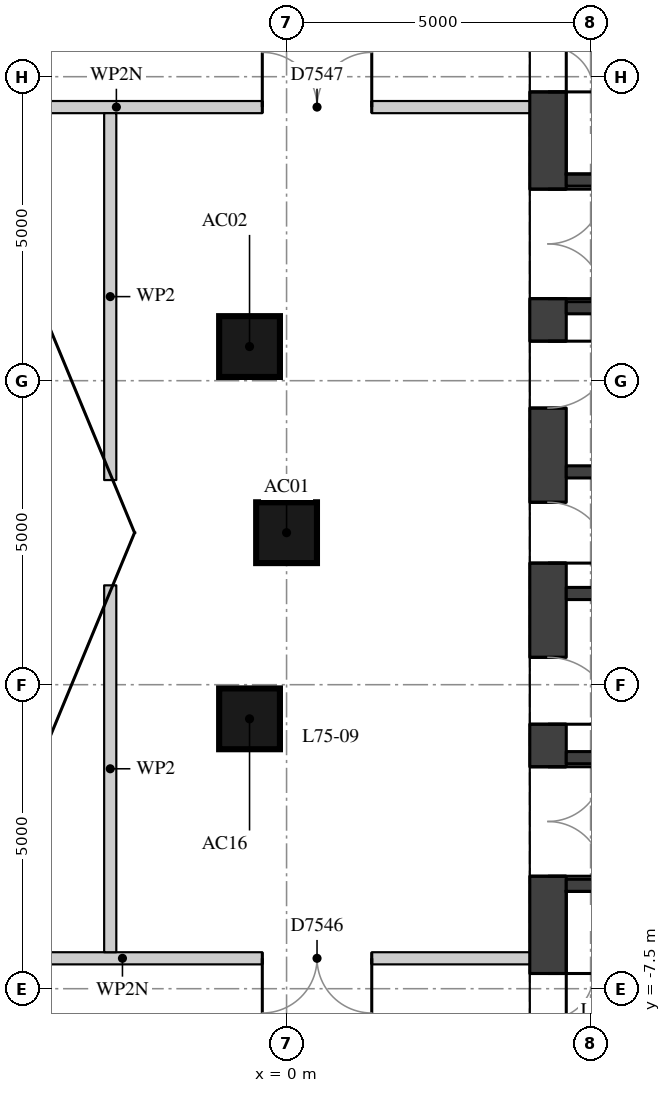
"""IFC4 building model, lengths in metres.
Left out: names, types, materials, properties, quantities, classifications, styles, units other than length and angle.
Written with IfcOpenShell. Run it as: python <this file> out.ifc"""

import sys

from ifc_helpers import new_model, si_unit, direction, frame, frame_2d, origin, origin_2d, place, context, subcontext, project, spatial, rectangle, extrude, element, fill, save


model = new_model("IFC4")
c1 = context("Model", 3, precision=1e-05, world=origin(), true_north=direction((0.0, 1.0)))
c2 = subcontext(c1, "Body", "Model", "MODEL_VIEW")
j1 = project(units=[si_unit("LENGTHUNIT", "METRE"), si_unit("PLANEANGLEUNIT", "RADIAN")], contexts=[c1])
p1 = place(None, origin())
s1 = spatial("IfcSite", under=j1, at=p1, CompositionType="ELEMENT")
p2 = place(p1, origin())
s2 = spatial("IfcBuilding", under=s1, at=p2, CompositionType="ELEMENT")
p3 = place(p2, frame((0.0, 0.0, 264.2)))
s3 = spatial("IfcBuildingStorey", under=s2, at=p3, CompositionType="ELEMENT", Elevation=264.2)
for number, where, z_axis, x_axis in (
    (1, (0.0, 0.0, 0.0), (0.0, 0.0, 1.0), (1.0, 0.0, 0.0)),
    (2, (-0.609, 3.062, 0.0), (0.0, 0.0, 1.0), (1.0, 0.0, 0.0)),
    (3, (-0.609, -3.062, 0.0), (0.0, 0.0, 1.0), (1.0, 0.0, 0.0)),
):
    element("IfcColumn", number, at=place(p3, frame(where, z_axis=z_axis, x_axis=x_axis)), inside=s3, PredefinedType="COLUMN", context=c2, shape_type="SweptSolid", body=[
        extrude(rectangle(XDim=1.0, YDim=1.0, at=origin_2d()), origin(), (0.0, 0.0, 1.0), 5.0),
    ])
p4 = place(p3, frame((4.3, -9.4, 0.0), z_axis=(0.0, 0.0, 1.0), x_axis=(0.0, 1.0, 0.0)))
e4 = element("IfcWall", 4, at=p4, inside=s3, PredefinedType="SHEAR", context=c2, shape_type="SweptSolid", body=[
    extrude(rectangle(XDim=18.8, YDim=0.6, at=frame_2d((9.4, 0.0))), origin(), (0.0, 0.0, 1.0), 4.59),
])
p5 = place(p4, frame((0.65, 0.0, 0.0)))
e5 = element("IfcOpeningElement", 5, at=p5, cuts=e4, PredefinedType="OPENING", context=c2, shape_type="SweptSolid", body=[
    extrude(rectangle(XDim=1.5, YDim=2.1, at=frame_2d((0.75, 1.05))), frame((0.0, 0.31, 0.0), z_axis=(0.0, -1.0, 0.0), x_axis=(1.0, 0.0, 0.0)), (0.0, 0.0, 1.0), 0.62),
])
p6 = place(p4, frame((3.75, 0.0, 0.0)))
e6 = element("IfcOpeningElement", 6, at=p6, cuts=e4, PredefinedType="OPENING", context=c2, shape_type="SweptSolid", body=[
    extrude(rectangle(XDim=1.8, YDim=2.1, at=frame_2d((0.9, 1.05))), frame((0.0, 0.31, 0.0), z_axis=(0.0, -1.0, 0.0), x_axis=(1.0, 0.0, 0.0)), (0.0, 0.0, 1.0), 0.62),
])
p7 = place(p4, frame((6.25, 0.0, 0.0)))
e7 = element("IfcOpeningElement", 7, at=p7, cuts=e4, PredefinedType="OPENING", context=c2, shape_type="SweptSolid", body=[
    extrude(rectangle(XDim=1.1, YDim=2.1, at=frame_2d((0.55, 1.05))), frame((0.0, 0.31, 0.0), z_axis=(0.0, -1.0, 0.0), x_axis=(1.0, 0.0, 0.0)), (0.0, 0.0, 1.0), 0.62),
])
p8 = place(p4, frame((8.9, 0.0, 0.0)))
e8 = element("IfcOpeningElement", 8, at=p8, cuts=e4, PredefinedType="OPENING", context=c2, shape_type="SweptSolid", body=[
    extrude(rectangle(XDim=1.0, YDim=2.1, at=frame_2d((0.5, 1.05))), frame((0.0, 0.31, 0.0), z_axis=(0.0, -1.0, 0.0), x_axis=(1.0, 0.0, 0.0)), (0.0, 0.0, 1.0), 0.62),
])
p9 = place(p4, frame((11.45, 0.0, 0.0)))
e9 = element("IfcOpeningElement", 9, at=p9, cuts=e4, PredefinedType="OPENING", context=c2, shape_type="SweptSolid", body=[
    extrude(rectangle(XDim=1.1, YDim=2.1, at=frame_2d((0.55, 1.05))), frame((0.0, 0.31, 0.0), z_axis=(0.0, -1.0, 0.0), x_axis=(1.0, 0.0, 0.0)), (0.0, 0.0, 1.0), 0.62),
])
p10 = place(p4, frame((13.25, 0.0, 0.0)))
e10 = element("IfcOpeningElement", 10, at=p10, cuts=e4, PredefinedType="OPENING", context=c2, shape_type="SweptSolid", body=[
    extrude(rectangle(XDim=1.8, YDim=2.1, at=frame_2d((0.9, 1.05))), frame((0.0, 0.31, 0.0), z_axis=(0.0, -1.0, 0.0), x_axis=(1.0, 0.0, 0.0)), (0.0, 0.0, 1.0), 0.62),
])
p11 = place(p4, frame((16.65, 0.0, 0.0)))
e11 = element("IfcOpeningElement", 11, at=p11, cuts=e4, PredefinedType="OPENING", context=c2, shape_type="SweptSolid", body=[
    extrude(rectangle(XDim=1.5, YDim=2.1, at=frame_2d((0.75, 1.05))), frame((0.0, 0.31, 0.0), z_axis=(0.0, -1.0, 0.0), x_axis=(1.0, 0.0, 0.0)), (0.0, 0.0, 1.0), 0.62),
])
p12 = place(p3, frame((4.6, 5.8, 0.0), z_axis=(0.0, 0.0, 1.0), x_axis=(1.0, 0.0, 0.0)))
e12 = element("IfcWall", 12, at=p12, inside=s3, PredefinedType="SHEAR", context=c2, shape_type="SweptSolid", body=[
    extrude(rectangle(XDim=10.8, YDim=0.2, at=frame_2d((5.4, 0.0))), origin(), (0.0, 0.0, 1.0), 4.59),
])
p13 = place(p12, frame((8.15, 0.0, 0.0)))
e13 = element("IfcOpeningElement", 13, at=p13, cuts=e12, PredefinedType="OPENING", context=c2, shape_type="SweptSolid", body=[
    extrude(rectangle(XDim=0.9, YDim=2.1, at=frame_2d((0.45, 1.05))), frame((0.0, 0.11, 0.0), z_axis=(0.0, -1.0, 0.0), x_axis=(1.0, 0.0, 0.0)), (0.0, 0.0, 1.0), 0.22),
])
p14 = place(p3, frame((4.6, 3.7, 0.0), z_axis=(0.0, 0.0, 1.0), x_axis=(1.0, 0.0, 0.0)))
e14 = element("IfcWall", 14, at=p14, inside=s3, PredefinedType="SHEAR", context=c2, shape_type="SweptSolid", body=[
    extrude(rectangle(XDim=10.8, YDim=0.2, at=frame_2d((5.4, 0.0))), origin(), (0.0, 0.0, 1.0), 4.59),
])
p15 = place(p14, frame((7.85, 0.0, 0.0)))
e15 = element("IfcOpeningElement", 15, at=p15, cuts=e14, PredefinedType="OPENING", context=c2, shape_type="SweptSolid", body=[
    extrude(rectangle(XDim=0.9, YDim=2.1, at=frame_2d((0.45, 1.05))), frame((0.0, 0.11, 0.0), z_axis=(0.0, -1.0, 0.0), x_axis=(1.0, 0.0, 0.0)), (0.0, 0.0, 1.0), 0.22),
])
for number, where, z_axis, x_axis in (
    (16, (4.6, 1.0, 0.0), (0.0, 0.0, 1.0), (1.0, 0.0, 0.0)),
    (17, (4.6, -1.0, 0.0), (0.0, 0.0, 1.0), (1.0, 0.0, 0.0)),
):
    element("IfcWall", number, at=place(p3, frame(where, z_axis=z_axis, x_axis=x_axis)), inside=s3, PredefinedType="SHEAR", context=c2, shape_type="SweptSolid", body=[
        extrude(rectangle(XDim=10.8, YDim=0.2, at=frame_2d((5.4, 0.0))), origin(), (0.0, 0.0, 1.0), 4.59),
    ])
p16 = place(p3, frame((4.6, -3.7, 0.0), z_axis=(0.0, 0.0, 1.0), x_axis=(1.0, 0.0, 0.0)))
e18 = element("IfcWall", 18, at=p16, inside=s3, PredefinedType="SHEAR", context=c2, shape_type="SweptSolid", body=[
    extrude(rectangle(XDim=10.8, YDim=0.2, at=frame_2d((5.4, 0.0))), origin(), (0.0, 0.0, 1.0), 4.59),
])
p17 = place(p16, frame((7.85, 0.0, 0.0)))
e19 = element("IfcOpeningElement", 19, at=p17, cuts=e18, PredefinedType="OPENING", context=c2, shape_type="SweptSolid", body=[
    extrude(rectangle(XDim=0.9, YDim=2.1, at=frame_2d((0.45, 1.05))), frame((0.0, 0.11, 0.0), z_axis=(0.0, -1.0, 0.0), x_axis=(1.0, 0.0, 0.0)), (0.0, 0.0, 1.0), 0.22),
])
p18 = place(p3, frame((4.6, -5.8, 0.0), z_axis=(0.0, 0.0, 1.0), x_axis=(1.0, 0.0, 0.0)))
e20 = element("IfcWall", 20, at=p18, inside=s3, PredefinedType="SHEAR", context=c2, shape_type="SweptSolid", body=[
    extrude(rectangle(XDim=10.8, YDim=0.2, at=frame_2d((5.4, 0.0))), origin(), (0.0, 0.0, 1.0), 4.59),
])
p19 = place(p18, frame((7.0, 0.0, 0.0)))
e21 = element("IfcOpeningElement", 21, at=p19, cuts=e20, PredefinedType="OPENING", context=c2, shape_type="SweptSolid", body=[
    extrude(rectangle(XDim=1.2, YDim=2.1, at=frame_2d((0.6, 1.05))), frame((0.0, 0.11, 0.0), z_axis=(0.0, -1.0, 0.0), x_axis=(1.0, 0.0, 0.0)), (0.0, 0.0, 1.0), 0.22),
])
p20 = place(p18, frame((9.0, 0.0, 0.0)))
e22 = element("IfcOpeningElement", 22, at=p20, cuts=e20, PredefinedType="OPENING", context=c2, shape_type="SweptSolid", body=[
    extrude(rectangle(XDim=1.2, YDim=2.1, at=frame_2d((0.6, 1.05))), frame((0.0, 0.11, 0.0), z_axis=(0.0, -1.0, 0.0), x_axis=(1.0, 0.0, 0.0)), (0.0, 0.0, 1.0), 0.22),
])
p21 = place(p3, frame((-9.4, -7.0, 0.0), z_axis=(0.0, 0.0, 1.0), x_axis=(1.0, 0.0, 0.0)))
e23 = element("IfcWall", 23, at=p21, inside=s3, PredefinedType="PARTITIONING", context=c2, shape_type="SweptSolid", body=[
    extrude(rectangle(XDim=13.402, YDim=0.2, at=frame_2d((6.701, 0.0))), origin(), (0.0, 0.0, 1.0), 4.04),
])
p22 = place(p21, frame((9.001, 0.0, 0.0)))
e24 = element("IfcOpeningElement", 24, at=p22, cuts=e23, PredefinedType="OPENING", context=c2, shape_type="SweptSolid", body=[
    extrude(rectangle(XDim=1.8, YDim=2.1, at=frame_2d((0.9, 1.05))), frame((0.0, 0.11, 0.0), z_axis=(0.0, -1.0, 0.0), x_axis=(1.0, 0.0, 0.0)), (0.0, 0.0, 1.0), 0.22),
])
p23 = place(p3, frame((-9.6, 7.0, 0.0), z_axis=(0.0, 0.0, 1.0), x_axis=(1.0, 0.0, 0.0)))
e25 = element("IfcWall", 25, at=p23, inside=s3, PredefinedType="PARTITIONING", context=c2, shape_type="SweptSolid", body=[
    extrude(rectangle(XDim=13.602, YDim=0.2, at=frame_2d((6.801, 0.0))), origin(), (0.0, 0.0, 1.0), 4.04),
])
p24 = place(p23, frame((9.201, 0.0, 0.0)))
e26 = element("IfcOpeningElement", 26, at=p24, cuts=e25, PredefinedType="OPENING", context=c2, shape_type="SweptSolid", body=[
    extrude(rectangle(XDim=1.8, YDim=2.1, at=frame_2d((0.9, 1.05))), frame((0.0, 0.11, 0.0), z_axis=(0.0, -1.0, 0.0), x_axis=(1.0, 0.0, 0.0)), (0.0, 0.0, 1.0), 0.22),
])
for number, where, z_axis, x_axis in (
    (27, (-2.9, -6.9, 0.0), (0.0, 0.0, 1.0), (0.0, 1.0, 0.0)),
    (28, (-2.9, 0.866, 0.0), (0.0, 0.0, 1.0), (0.0, 1.0, 0.0)),
):
    element("IfcWall", number, at=place(p3, frame(where, z_axis=z_axis, x_axis=x_axis)), inside=s3, PredefinedType="PARTITIONING", context=c2, shape_type="SweptSolid", body=[
        extrude(rectangle(XDim=6.034, YDim=0.2, at=frame_2d((3.017, 0.0))), origin(), (0.0, 0.0, 1.0), 4.59),
    ])
p25 = place(p5, origin())
e29 = element("IfcDoor", 29, at=p25, inside=s3, OperationType="DOUBLE_DOOR_SINGLE_SWING", PredefinedType="DOOR", context=c2, shape_type="SweptSolid", body=[
    extrude(rectangle(XDim=1.5, YDim=2.1, at=frame_2d((0.75, 1.05))), frame((0.0, 0.025, 0.0), z_axis=(0.0, -1.0, 0.0), x_axis=(1.0, 0.0, 0.0)), (0.0, 0.0, 1.0), 0.05),
])
fill(e5, e29)
p26 = place(p6, origin())
e30 = element("IfcDoor", 30, at=p26, inside=s3, OperationType="DOUBLE_DOOR_SINGLE_SWING", PredefinedType="DOOR", context=c2, shape_type="SweptSolid", body=[
    extrude(rectangle(XDim=1.8, YDim=2.1, at=frame_2d((0.9, 1.05))), frame((0.0, 0.025, 0.0), z_axis=(0.0, -1.0, 0.0), x_axis=(1.0, 0.0, 0.0)), (0.0, 0.0, 1.0), 0.05),
])
fill(e6, e30)
p27 = place(p7, origin())
e31 = element("IfcDoor", 31, at=p27, inside=s3, OperationType="SINGLE_SWING_RIGHT", PredefinedType="DOOR", context=c2, shape_type="SweptSolid", body=[
    extrude(rectangle(XDim=1.1, YDim=2.1, at=frame_2d((0.55, 1.05))), frame((0.0, 0.025, 0.0), z_axis=(0.0, -1.0, 0.0), x_axis=(1.0, 0.0, 0.0)), (0.0, 0.0, 1.0), 0.05),
])
fill(e7, e31)
p28 = place(p8, origin())
e32 = element("IfcDoor", 32, at=p28, inside=s3, OperationType="SINGLE_SWING_RIGHT", PredefinedType="DOOR", context=c2, shape_type="SweptSolid", body=[
    extrude(rectangle(XDim=1.0, YDim=2.1, at=frame_2d((0.5, 1.05))), frame((0.0, 0.025, 0.0), z_axis=(0.0, -1.0, 0.0), x_axis=(1.0, 0.0, 0.0)), (0.0, 0.0, 1.0), 0.05),
])
fill(e8, e32)
p29 = place(p9, origin())
e33 = element("IfcDoor", 33, at=p29, inside=s3, OperationType="SINGLE_SWING_LEFT", PredefinedType="DOOR", context=c2, shape_type="SweptSolid", body=[
    extrude(rectangle(XDim=1.1, YDim=2.1, at=frame_2d((0.55, 1.05))), frame((0.0, 0.025, 0.0), z_axis=(0.0, -1.0, 0.0), x_axis=(1.0, 0.0, 0.0)), (0.0, 0.0, 1.0), 0.05),
])
fill(e9, e33)
p30 = place(p10, origin())
e34 = element("IfcDoor", 34, at=p30, inside=s3, OperationType="DOUBLE_DOOR_SINGLE_SWING", PredefinedType="DOOR", context=c2, shape_type="SweptSolid", body=[
    extrude(rectangle(XDim=1.8, YDim=2.1, at=frame_2d((0.9, 1.05))), frame((0.0, 0.025, 0.0), z_axis=(0.0, -1.0, 0.0), x_axis=(1.0, 0.0, 0.0)), (0.0, 0.0, 1.0), 0.05),
])
fill(e10, e34)
p31 = place(p11, origin())
e35 = element("IfcDoor", 35, at=p31, inside=s3, OperationType="DOUBLE_DOOR_SINGLE_SWING", PredefinedType="DOOR", context=c2, shape_type="SweptSolid", body=[
    extrude(rectangle(XDim=1.5, YDim=2.1, at=frame_2d((0.75, 1.05))), frame((0.0, 0.025, 0.0), z_axis=(0.0, -1.0, 0.0), x_axis=(1.0, 0.0, 0.0)), (0.0, 0.0, 1.0), 0.05),
])
fill(e11, e35)
p32 = place(p24, origin())
e36 = element("IfcDoor", 36, at=p32, inside=s3, OperationType="DOUBLE_DOOR_SINGLE_SWING", PredefinedType="DOOR", context=c2, shape_type="SweptSolid", body=[
    extrude(rectangle(XDim=1.8, YDim=2.1, at=frame_2d((0.9, 1.05))), frame((0.0, 0.025, 0.0), z_axis=(0.0, -1.0, 0.0), x_axis=(1.0, 0.0, 0.0)), (0.0, 0.0, 1.0), 0.05),
])
fill(e26, e36)
p33 = place(p22, origin())
e37 = element("IfcDoor", 37, at=p33, inside=s3, OperationType="DOUBLE_DOOR_SINGLE_SWING", PredefinedType="DOOR", context=c2, shape_type="SweptSolid", body=[
    extrude(rectangle(XDim=1.8, YDim=2.1, at=frame_2d((0.9, 1.05))), frame((0.0, 0.025, 0.0), z_axis=(0.0, -1.0, 0.0), x_axis=(1.0, 0.0, 0.0)), (0.0, 0.0, 1.0), 0.05),
])
fill(e24, e37)
save(model, sys.argv[1])
